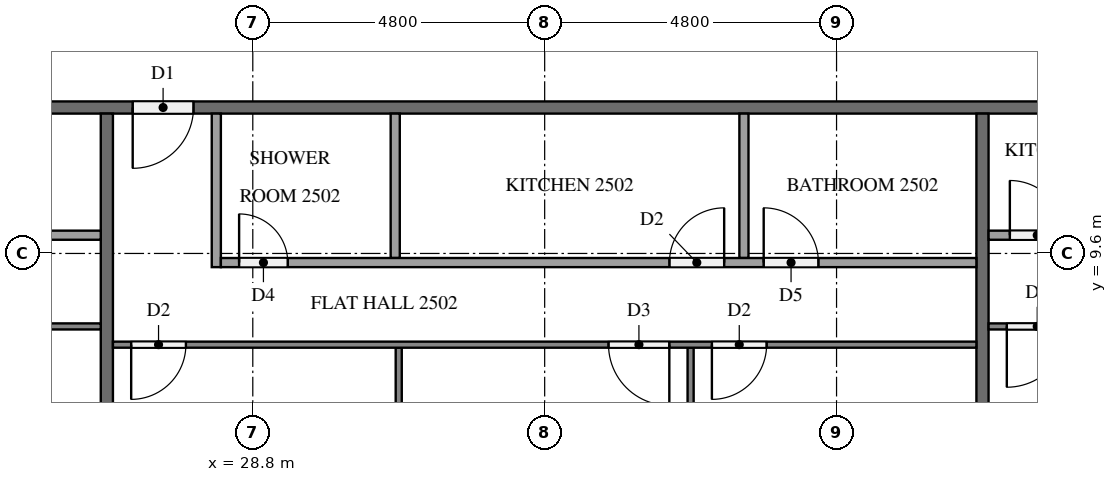
"""IFC4 building model, lengths in metres.
Left out: names, types, materials, properties, quantities, classifications, styles, units other than length and angle.
Written with IfcOpenShell. Run it as: python <this file> out.ifc"""

import sys

from ifc_helpers import new_model, si_unit, direction, frame, frame_2d, origin, place, context, subcontext, project, spatial, rectangle, extrude, element, fill, save


model = new_model("IFC4")
c1 = context("Model", 3, precision=1e-05, world=origin(), true_north=direction((0.0, 1.0)))
c2 = subcontext(c1, "Body", "Model", "MODEL_VIEW")
j1 = project(units=[si_unit("LENGTHUNIT", "METRE"), si_unit("PLANEANGLEUNIT", "RADIAN")], contexts=[c1])
p1 = place(None, origin())
s1 = spatial("IfcSite", under=j1, at=p1, CompositionType="ELEMENT")
p2 = place(p1, origin())
s2 = spatial("IfcBuilding", under=s1, at=p2, CompositionType="ELEMENT")
p3 = place(p2, frame((0.0, 0.0, 99.7)))
s3 = spatial("IfcBuildingStorey", under=s2, at=p3, CompositionType="ELEMENT", Elevation=99.7)
p4 = place(p3, frame((50.5, 12.0, 0.0), z_axis=(0.0, 0.0, 1.0), x_axis=(-1.0, 0.0, 0.0)))
e1 = element("IfcWall", 1, at=p4, inside=s3, PredefinedType="PARTITIONING", context=c2, shape_type="SweptSolid", body=[
    extrude(rectangle(XDim=38.6, YDim=0.2, at=frame_2d((19.3, 0.0))), origin(), (0.0, 0.0, 1.0), 3.2),
])
p5 = place(p4, frame((37.075, 0.0, 0.0)))
e2 = element("IfcOpeningElement", 2, at=p5, cuts=e1, PredefinedType="OPENING", context=c2, shape_type="SweptSolid", body=[
    extrude(rectangle(XDim=1.0, YDim=2.1, at=frame_2d((0.5, 1.05))), frame((0.0, 0.11, 0.0), z_axis=(0.0, -1.0, 0.0), x_axis=(1.0, 0.0, 0.0)), (0.0, 0.0, 1.0), 0.22),
])
p6 = place(p4, frame((22.675, 0.0, 0.0)))
e3 = element("IfcOpeningElement", 3, at=p6, cuts=e1, PredefinedType="OPENING", context=c2, shape_type="SweptSolid", body=[
    extrude(rectangle(XDim=1.0, YDim=2.1, at=frame_2d((0.5, 1.05))), frame((0.0, 0.11, 0.0), z_axis=(0.0, -1.0, 0.0), x_axis=(1.0, 0.0, 0.0)), (0.0, 0.0, 1.0), 0.22),
])
p7 = place(p4, frame((0.525, 0.0, 0.0)))
e4 = element("IfcOpeningElement", 4, at=p7, cuts=e1, PredefinedType="OPENING", context=c2, shape_type="SweptSolid", body=[
    extrude(rectangle(XDim=1.0, YDim=2.1, at=frame_2d((0.5, 1.05))), frame((0.0, 0.11, 0.0), z_axis=(0.0, -1.0, 0.0), x_axis=(1.0, 0.0, 0.0)), (0.0, 0.0, 1.0), 0.22),
])
for number, where, z_axis, x_axis in (
    (5, (26.4, 11.9, 0.0), (0.0, 0.0, 1.0), (0.0, -1.0, 0.0)),
    (6, (40.8, 11.9, 0.0), (0.0, 0.0, 1.0), (0.0, -1.0, 0.0)),
):
    element("IfcWall", number, at=place(p3, frame(where, z_axis=z_axis, x_axis=x_axis)), inside=s3, PredefinedType="PARTITIONING", context=c2, shape_type="SweptSolid", body=[
        extrude(rectangle(XDim=7.0, YDim=0.2, at=frame_2d((3.5, 0.0))), origin(), (0.0, 0.0, 1.0), 3.2),
    ])
p8 = place(p3, frame((26.3, 8.4, 0.0), z_axis=(0.0, 0.0, 1.0), x_axis=(-1.0, 0.0, 0.0)))
e7 = element("IfcWall", 7, at=p8, inside=s3, PredefinedType="PARTITIONING", context=c2, shape_type="SweptSolid", body=[
    extrude(rectangle(XDim=14.2, YDim=0.1, at=frame_2d((7.1, 0.0))), origin(), (0.0, 0.0, 1.0), 3.2),
])
p9 = place(p8, frame((12.9, 0.0, 0.0)))
e8 = element("IfcOpeningElement", 8, at=p9, cuts=e7, PredefinedType="OPENING", context=c2, shape_type="SweptSolid", body=[
    extrude(rectangle(XDim=1.0, YDim=2.1, at=frame_2d((0.5, 1.05))), frame((0.0, 0.06, 0.0), z_axis=(0.0, -1.0, 0.0), x_axis=(1.0, 0.0, 0.0)), (0.0, 0.0, 1.0), 0.12),
])
p10 = place(p8, frame((5.05, 0.0, 0.0)))
e9 = element("IfcOpeningElement", 9, at=p10, cuts=e7, PredefinedType="OPENING", context=c2, shape_type="SweptSolid", body=[
    extrude(rectangle(XDim=0.9, YDim=2.1, at=frame_2d((0.45, 1.05))), frame((0.0, 0.06, 0.0), z_axis=(0.0, -1.0, 0.0), x_axis=(1.0, 0.0, 0.0)), (0.0, 0.0, 1.0), 0.12),
])
p11 = place(p8, frame((3.45, 0.0, 0.0)))
e10 = element("IfcOpeningElement", 10, at=p11, cuts=e7, PredefinedType="OPENING", context=c2, shape_type="SweptSolid", body=[
    extrude(rectangle(XDim=0.9, YDim=2.1, at=frame_2d((0.45, 1.05))), frame((0.0, 0.06, 0.0), z_axis=(0.0, -1.0, 0.0), x_axis=(1.0, 0.0, 0.0)), (0.0, 0.0, 1.0), 0.12),
])
p12 = place(p3, frame((13.875, 9.9, 0.0), z_axis=(0.0, 0.0, 1.0), x_axis=(1.0, 0.0, 0.0)))
e11 = element("IfcWall", 11, at=p12, inside=s3, PredefinedType="PARTITIONING", context=c2, shape_type="SweptSolid", body=[
    extrude(rectangle(XDim=12.425, YDim=0.15, at=frame_2d((6.212, 0.0))), origin(), (0.0, 0.0, 1.0), 3.2),
])
p13 = place(p12, frame((0.3, 0.0, 0.0)))
e12 = element("IfcOpeningElement", 12, at=p13, cuts=e11, PredefinedType="OPENING", context=c2, shape_type="SweptSolid", body=[
    extrude(rectangle(XDim=0.8, YDim=2.1, at=frame_2d((0.4, 1.05))), frame((0.0, 0.085, 0.0), z_axis=(0.0, -1.0, 0.0), x_axis=(1.0, 0.0, 0.0)), (0.0, 0.0, 1.0), 0.17),
])
p14 = place(p12, frame((5.465, 0.0, 0.0)))
e13 = element("IfcOpeningElement", 13, at=p14, cuts=e11, PredefinedType="OPENING", context=c2, shape_type="SweptSolid", body=[
    extrude(rectangle(XDim=0.9, YDim=2.1, at=frame_2d((0.45, 1.05))), frame((0.0, 0.085, 0.0), z_axis=(0.0, -1.0, 0.0), x_axis=(1.0, 0.0, 0.0)), (0.0, 0.0, 1.0), 0.17),
])
p15 = place(p12, frame((7.015, 0.0, 0.0)))
e14 = element("IfcOpeningElement", 14, at=p15, cuts=e11, PredefinedType="OPENING", context=c2, shape_type="SweptSolid", body=[
    extrude(rectangle(XDim=0.9, YDim=2.1, at=frame_2d((0.45, 1.05))), frame((0.0, 0.085, 0.0), z_axis=(0.0, -1.0, 0.0), x_axis=(1.0, 0.0, 0.0)), (0.0, 0.0, 1.0), 0.17),
])
for number, where, z_axis, x_axis in (
    (15, (31.2, 8.05, 0.0), (0.0, 0.0, 1.0), (0.0, -1.0, 0.0)),
    (16, (36.0, 8.05, 0.0), (0.0, 0.0, 1.0), (0.0, -1.0, 0.0)),
):
    element("IfcWall", number, at=place(p3, frame(where, z_axis=z_axis, x_axis=x_axis)), inside=s3, PredefinedType="PARTITIONING", context=c2, shape_type="SweptSolid", body=[
        extrude(rectangle(XDim=3.15, YDim=0.1, at=frame_2d((1.575, 0.0))), origin(), (0.0, 0.0, 1.0), 3.2),
    ])
p16 = place(p3, frame((40.7, 8.1, 0.0), z_axis=(0.0, 0.0, 1.0), x_axis=(-1.0, 0.0, 0.0)))
e17 = element("IfcWall", 17, at=p16, inside=s3, PredefinedType="PARTITIONING", context=c2, shape_type="SweptSolid", body=[
    extrude(rectangle(XDim=14.2, YDim=0.1, at=frame_2d((7.1, 0.0))), origin(), (0.0, 0.0, 1.0), 3.2),
])
p17 = place(p16, frame((13.0, 0.0, 0.0)))
e18 = element("IfcOpeningElement", 18, at=p17, cuts=e17, PredefinedType="OPENING", context=c2, shape_type="SweptSolid", body=[
    extrude(rectangle(XDim=0.9, YDim=2.1, at=frame_2d((0.45, 1.05))), frame((0.0, 0.06, 0.0), z_axis=(0.0, -1.0, 0.0), x_axis=(1.0, 0.0, 0.0)), (0.0, 0.0, 1.0), 0.12),
])
p18 = place(p16, frame((5.05, 0.0, 0.0)))
e19 = element("IfcOpeningElement", 19, at=p18, cuts=e17, PredefinedType="OPENING", context=c2, shape_type="SweptSolid", body=[
    extrude(rectangle(XDim=1.0, YDim=2.1, at=frame_2d((0.5, 1.05))), frame((0.0, 0.06, 0.0), z_axis=(0.0, -1.0, 0.0), x_axis=(1.0, 0.0, 0.0)), (0.0, 0.0, 1.0), 0.12),
])
p19 = place(p16, frame((3.45, 0.0, 0.0)))
e20 = element("IfcOpeningElement", 20, at=p19, cuts=e17, PredefinedType="OPENING", context=c2, shape_type="SweptSolid", body=[
    extrude(rectangle(XDim=0.9, YDim=2.1, at=frame_2d((0.45, 1.05))), frame((0.0, 0.06, 0.0), z_axis=(0.0, -1.0, 0.0), x_axis=(1.0, 0.0, 0.0)), (0.0, 0.0, 1.0), 0.12),
])
for number, where, z_axis, x_axis in (
    (21, (31.142, 11.9, 0.0), (0.0, 0.0, 1.0), (0.0, -1.0, 0.0)),
    (22, (36.877, 11.9, 0.0), (0.0, 0.0, 1.0), (0.0, -1.0, 0.0)),
):
    element("IfcWall", number, at=place(p3, frame(where, z_axis=z_axis, x_axis=x_axis)), inside=s3, PredefinedType="PARTITIONING", context=c2, shape_type="SweptSolid", body=[
        extrude(rectangle(XDim=2.375, YDim=0.15, at=frame_2d((1.188, 0.0))), origin(), (0.0, 0.0, 1.0), 3.2),
    ])
p20 = place(p3, frame((28.2, 11.9, 0.0), z_axis=(0.0, 0.0, 1.0), x_axis=(0.0, -1.0, 0.0)))
e23 = element("IfcWall", 23, at=p20, inside=s3, PredefinedType="PARTITIONING", context=c2, shape_type="SweptSolid", body=[
    extrude(rectangle(XDim=2.525, YDim=0.15, at=frame_2d((1.262, 0.0))), origin(), (0.0, 0.0, 1.0), 3.2),
])
p21 = place(p3, frame((28.275, 9.45, 0.0), z_axis=(0.0, 0.0, 1.0), x_axis=(1.0, 0.0, 0.0)))
e24 = element("IfcWall", 24, at=p21, inside=s3, PredefinedType="PARTITIONING", context=c2, shape_type="SweptSolid", body=[
    extrude(rectangle(XDim=12.425, YDim=0.15, at=frame_2d((6.212, 0.0))), origin(), (0.0, 0.0, 1.0), 3.2),
])
p22 = place(p21, frame((0.3, 0.0, 0.0)))
e25 = element("IfcOpeningElement", 25, at=p22, cuts=e24, PredefinedType="OPENING", context=c2, shape_type="SweptSolid", body=[
    extrude(rectangle(XDim=0.8, YDim=2.1, at=frame_2d((0.4, 1.05))), frame((0.0, 0.085, 0.0), z_axis=(0.0, -1.0, 0.0), x_axis=(1.0, 0.0, 0.0)), (0.0, 0.0, 1.0), 0.17),
])
p23 = place(p21, frame((7.377, 0.0, 0.0)))
e26 = element("IfcOpeningElement", 26, at=p23, cuts=e24, PredefinedType="OPENING", context=c2, shape_type="SweptSolid", body=[
    extrude(rectangle(XDim=0.9, YDim=2.1, at=frame_2d((0.45, 1.05))), frame((0.0, 0.085, 0.0), z_axis=(0.0, -1.0, 0.0), x_axis=(1.0, 0.0, 0.0)), (0.0, 0.0, 1.0), 0.17),
])
p24 = place(p21, frame((8.927, 0.0, 0.0)))
e27 = element("IfcOpeningElement", 27, at=p24, cuts=e24, PredefinedType="OPENING", context=c2, shape_type="SweptSolid", body=[
    extrude(rectangle(XDim=0.9, YDim=2.1, at=frame_2d((0.45, 1.05))), frame((0.0, 0.085, 0.0), z_axis=(0.0, -1.0, 0.0), x_axis=(1.0, 0.0, 0.0)), (0.0, 0.0, 1.0), 0.17),
])
p25 = place(p3, frame((50.3, 8.4, 0.0), z_axis=(0.0, 0.0, 1.0), x_axis=(-1.0, 0.0, 0.0)))
e28 = element("IfcWall", 28, at=p25, inside=s3, PredefinedType="PARTITIONING", context=c2, shape_type="SweptSolid", body=[
    extrude(rectangle(XDim=9.4, YDim=0.1, at=frame_2d((4.7, 0.0))), origin(), (0.0, 0.0, 1.0), 3.2),
])
p26 = place(p25, frame((0.3, 0.0, 0.0)))
e29 = element("IfcOpeningElement", 29, at=p26, cuts=e28, PredefinedType="OPENING", context=c2, shape_type="SweptSolid", body=[
    extrude(rectangle(XDim=0.9, YDim=2.1, at=frame_2d((0.45, 1.05))), frame((0.0, 0.06, 0.0), z_axis=(0.0, -1.0, 0.0), x_axis=(1.0, 0.0, 0.0)), (0.0, 0.0, 1.0), 0.12),
])
p27 = place(p25, frame((8.1, 0.0, 0.0)))
e30 = element("IfcOpeningElement", 30, at=p27, cuts=e28, PredefinedType="OPENING", context=c2, shape_type="SweptSolid", body=[
    extrude(rectangle(XDim=1.0, YDim=2.1, at=frame_2d((0.5, 1.05))), frame((0.0, 0.06, 0.0), z_axis=(0.0, -1.0, 0.0), x_axis=(1.0, 0.0, 0.0)), (0.0, 0.0, 1.0), 0.12),
])
p28 = place(p3, frame((40.9, 9.9, 0.0), z_axis=(0.0, 0.0, 1.0), x_axis=(1.0, 0.0, 0.0)))
e31 = element("IfcWall", 31, at=p28, inside=s3, PredefinedType="PARTITIONING", context=c2, shape_type="SweptSolid", body=[
    extrude(rectangle(XDim=7.625, YDim=0.15, at=frame_2d((3.812, 0.0))), origin(), (0.0, 0.0, 1.0), 3.2),
])
p29 = place(p28, frame((6.525, 0.0, 0.0)))
e32 = element("IfcOpeningElement", 32, at=p29, cuts=e31, PredefinedType="OPENING", context=c2, shape_type="SweptSolid", body=[
    extrude(rectangle(XDim=0.8, YDim=2.1, at=frame_2d((0.4, 1.05))), frame((0.0, 0.085, 0.0), z_axis=(0.0, -1.0, 0.0), x_axis=(1.0, 0.0, 0.0)), (0.0, 0.0, 1.0), 0.17),
])
p30 = place(p28, frame((0.35, 0.0, 0.0)))
e33 = element("IfcOpeningElement", 33, at=p30, cuts=e31, PredefinedType="OPENING", context=c2, shape_type="SweptSolid", body=[
    extrude(rectangle(XDim=0.9, YDim=2.1, at=frame_2d((0.45, 1.05))), frame((0.0, 0.085, 0.0), z_axis=(0.0, -1.0, 0.0), x_axis=(1.0, 0.0, 0.0)), (0.0, 0.0, 1.0), 0.17),
])
p31 = place(p6, origin())
e34 = element("IfcDoor", 34, at=p31, inside=s3, OperationType="SINGLE_SWING_RIGHT", PredefinedType="DOOR", context=c2, shape_type="SweptSolid", body=[
    extrude(rectangle(XDim=1.0, YDim=2.1, at=frame_2d((0.5, 1.05))), frame((0.0, 0.025, 0.0), z_axis=(0.0, -1.0, 0.0), x_axis=(1.0, 0.0, 0.0)), (0.0, 0.0, 1.0), 0.05),
])
fill(e3, e34)
p32 = place(p17, origin())
e35 = element("IfcDoor", 35, at=p32, inside=s3, OperationType="SINGLE_SWING_RIGHT", PredefinedType="DOOR", context=c2, shape_type="SweptSolid", body=[
    extrude(rectangle(XDim=0.9, YDim=2.1, at=frame_2d((0.45, 1.05))), frame((0.0, 0.025, 0.0), z_axis=(0.0, -1.0, 0.0), x_axis=(1.0, 0.0, 0.0)), (0.0, 0.0, 1.0), 0.05),
])
fill(e18, e35)
p33 = place(p18, origin())
e36 = element("IfcDoor", 36, at=p33, inside=s3, OperationType="SINGLE_SWING_LEFT", PredefinedType="DOOR", context=c2, shape_type="SweptSolid", body=[
    extrude(rectangle(XDim=1.0, YDim=2.1, at=frame_2d((0.5, 1.05))), frame((0.0, 0.025, 0.0), z_axis=(0.0, -1.0, 0.0), x_axis=(1.0, 0.0, 0.0)), (0.0, 0.0, 1.0), 0.05),
])
fill(e19, e36)
p34 = place(p19, origin())
e37 = element("IfcDoor", 37, at=p34, inside=s3, OperationType="SINGLE_SWING_RIGHT", PredefinedType="DOOR", context=c2, shape_type="SweptSolid", body=[
    extrude(rectangle(XDim=0.9, YDim=2.1, at=frame_2d((0.45, 1.05))), frame((0.0, 0.025, 0.0), z_axis=(0.0, -1.0, 0.0), x_axis=(1.0, 0.0, 0.0)), (0.0, 0.0, 1.0), 0.05),
])
fill(e20, e37)
p35 = place(p22, origin())
e38 = element("IfcDoor", 38, at=p35, inside=s3, OperationType="SINGLE_SWING_LEFT", PredefinedType="DOOR", context=c2, shape_type="SweptSolid", body=[
    extrude(rectangle(XDim=0.8, YDim=2.1, at=frame_2d((0.4, 1.05))), frame((0.0, 0.025, 0.0), z_axis=(0.0, -1.0, 0.0), x_axis=(1.0, 0.0, 0.0)), (0.0, 0.0, 1.0), 0.05),
])
fill(e25, e38)
p36 = place(p23, origin())
e39 = element("IfcDoor", 39, at=p36, inside=s3, OperationType="SINGLE_SWING_RIGHT", PredefinedType="DOOR", context=c2, shape_type="SweptSolid", body=[
    extrude(rectangle(XDim=0.9, YDim=2.1, at=frame_2d((0.45, 1.05))), frame((0.0, 0.025, 0.0), z_axis=(0.0, -1.0, 0.0), x_axis=(1.0, 0.0, 0.0)), (0.0, 0.0, 1.0), 0.05),
])
fill(e26, e39)
p37 = place(p24, origin())
e40 = element("IfcDoor", 40, at=p37, inside=s3, OperationType="SINGLE_SWING_LEFT", PredefinedType="DOOR", context=c2, shape_type="SweptSolid", body=[
    extrude(rectangle(XDim=0.9, YDim=2.1, at=frame_2d((0.45, 1.05))), frame((0.0, 0.025, 0.0), z_axis=(0.0, -1.0, 0.0), x_axis=(1.0, 0.0, 0.0)), (0.0, 0.0, 1.0), 0.05),
])
fill(e27, e40)
p38 = place(p27, origin())
e41 = element("IfcDoor", 41, at=p38, inside=s3, OperationType="SINGLE_SWING_RIGHT", PredefinedType="DOOR", context=c2, shape_type="SweptSolid", body=[
    extrude(rectangle(XDim=1.0, YDim=2.1, at=frame_2d((0.5, 1.05))), frame((0.0, 0.025, 0.0), z_axis=(0.0, -1.0, 0.0), x_axis=(1.0, 0.0, 0.0)), (0.0, 0.0, 1.0), 0.05),
])
fill(e30, e41)
p39 = place(p30, origin())
e42 = element("IfcDoor", 42, at=p39, inside=s3, OperationType="SINGLE_SWING_LEFT", PredefinedType="DOOR", context=c2, shape_type="SweptSolid", body=[
    extrude(rectangle(XDim=0.9, YDim=2.1, at=frame_2d((0.45, 1.05))), frame((0.0, 0.025, 0.0), z_axis=(0.0, -1.0, 0.0), x_axis=(1.0, 0.0, 0.0)), (0.0, 0.0, 1.0), 0.05),
])
fill(e33, e42)
save(model, sys.argv[1])
